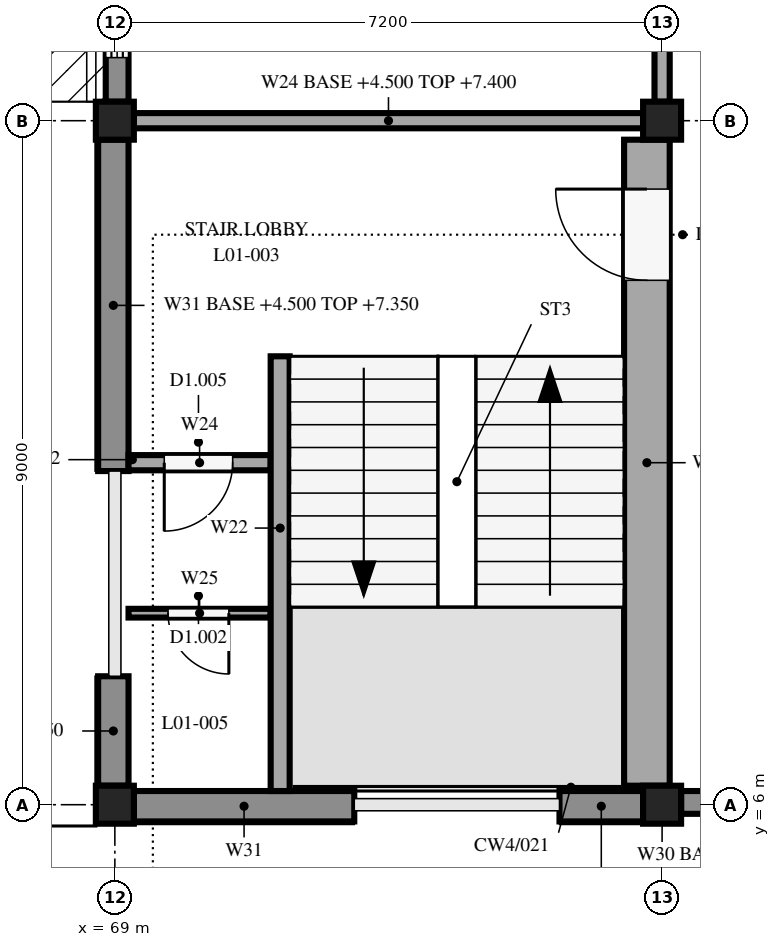
"""IFC4 building model, lengths in metres.
Left out: names, types, materials, properties, quantities, classifications, styles, units other than length and angle.
Written with IfcOpenShell. Run it as: python <this file> out.ifc"""

import sys

from ifc_helpers import new_model, si_unit, direction, frame, frame_2d, origin, origin_2d, place, context, subcontext, project, spatial, rectangle, extrude, element, fill, save


model = new_model("IFC4")
c1 = context("Model", 3, precision=1e-05, world=origin(), true_north=direction((0.0, 1.0)))
c2 = subcontext(c1, "Body", "Model", "MODEL_VIEW")
j1 = project(units=[si_unit("LENGTHUNIT", "METRE"), si_unit("PLANEANGLEUNIT", "RADIAN")], contexts=[c1])
p1 = place(None, origin())
s1 = spatial("IfcSite", under=j1, at=p1, CompositionType="ELEMENT")
p2 = place(p1, origin())
s2 = spatial("IfcBuilding", under=s1, at=p2, CompositionType="ELEMENT")
p3 = place(p2, frame((0.0, 0.0, 4.5)))
s3 = spatial("IfcBuildingStorey", under=s2, at=p3, CompositionType="ELEMENT", Elevation=4.5)
for number, where, z_axis, x_axis in (
    (1, (69.0, 6.0, 0.0), (0.0, 0.0, 1.0), (1.0, 0.0, 0.0)),
    (2, (69.0, 15.0, 0.0), (0.0, 0.0, 1.0), (1.0, 0.0, 0.0)),
    (3, (76.2, 6.0, 0.0), (0.0, 0.0, 1.0), (1.0, 0.0, 0.0)),
    (4, (76.2, 15.0, 0.0), (0.0, 0.0, 1.0), (1.0, 0.0, 0.0)),
):
    element("IfcColumn", number, at=place(p3, frame(where, z_axis=z_axis, x_axis=x_axis)), inside=s3, PredefinedType="COLUMN", context=c2, shape_type="SweptSolid", body=[
        extrude(rectangle(XDim=0.5, YDim=0.5, at=origin_2d()), origin(), (0.0, 0.0, 1.0), 3.35),
    ])
p4 = place(p3, frame((68.98, 6.25, 0.0), z_axis=(0.0, 0.0, 1.0), x_axis=(0.0, 1.0, 0.0)))
e5 = element("IfcWall", 5, at=p4, inside=s3, PredefinedType="STANDARD", context=c2, shape_type="SweptSolid", body=[
    extrude(rectangle(XDim=1.44, YDim=0.4, at=frame_2d((0.72, 0.0))), origin(), (0.0, 0.0, 1.0), 2.85),
])
p5 = place(p3, frame((68.98, 10.39, 0.0), z_axis=(0.0, 0.0, 1.0), x_axis=(0.0, 1.0, 0.0)))
e6 = element("IfcWall", 6, at=p5, inside=s3, PredefinedType="STANDARD", context=c2, shape_type="SweptSolid", body=[
    extrude(rectangle(XDim=4.36, YDim=0.4, at=frame_2d((2.18, 0.0))), origin(), (0.0, 0.0, 1.0), 2.85),
])
p6 = place(p3, frame((69.03, 15.25, 0.0), z_axis=(0.0, 0.0, 1.0), x_axis=(0.0, 1.0, 0.0)))
e7 = element("IfcWall", 7, at=p6, inside=s3, PredefinedType="STANDARD", context=c2, shape_type="SweptSolid", body=[
    extrude(rectangle(XDim=8.5, YDim=0.3, at=frame_2d((4.25, 0.0))), origin(), (0.0, 0.0, 1.0), 2.85),
])
p7 = place(p6, frame((0.58, 0.0, 0.3)))
e8 = element("IfcOpeningElement", 8, at=p7, cuts=e7, PredefinedType="OPENING", context=c2, shape_type="SweptSolid", body=[
    extrude(rectangle(XDim=1.4, YDim=2.5, at=frame_2d((0.7, 1.25))), frame((0.0, 0.16, 0.0), z_axis=(0.0, -1.0, 0.0), x_axis=(1.0, 0.0, 0.0)), (0.0, 0.0, 1.0), 0.32),
])
p8 = place(p6, frame((2.56, 0.0, 0.3)))
e9 = element("IfcOpeningElement", 9, at=p8, cuts=e7, PredefinedType="OPENING", context=c2, shape_type="SweptSolid", body=[
    extrude(rectangle(XDim=1.4, YDim=2.5, at=frame_2d((0.7, 1.25))), frame((0.0, 0.16, 0.0), z_axis=(0.0, -1.0, 0.0), x_axis=(1.0, 0.0, 0.0)), (0.0, 0.0, 1.0), 0.32),
])
p9 = place(p6, frame((4.54, 0.0, 0.3)))
e10 = element("IfcOpeningElement", 10, at=p9, cuts=e7, PredefinedType="OPENING", context=c2, shape_type="SweptSolid", body=[
    extrude(rectangle(XDim=1.4, YDim=2.5, at=frame_2d((0.7, 1.25))), frame((0.0, 0.16, 0.0), z_axis=(0.0, -1.0, 0.0), x_axis=(1.0, 0.0, 0.0)), (0.0, 0.0, 1.0), 0.32),
])
p10 = place(p6, frame((6.52, 0.0, 0.3)))
e11 = element("IfcOpeningElement", 11, at=p10, cuts=e7, PredefinedType="OPENING", context=c2, shape_type="SweptSolid", body=[
    extrude(rectangle(XDim=1.4, YDim=2.5, at=frame_2d((0.7, 1.25))), frame((0.0, 0.16, 0.0), z_axis=(0.0, -1.0, 0.0), x_axis=(1.0, 0.0, 0.0)), (0.0, 0.0, 1.0), 0.32),
])
p11 = place(p3, frame((72.15, 5.98, 0.0), z_axis=(0.0, 0.0, 1.0), x_axis=(-1.0, 0.0, 0.0)))
e12 = element("IfcWall", 12, at=p11, inside=s3, PredefinedType="STANDARD", context=c2, shape_type="SweptSolid", body=[
    extrude(rectangle(XDim=2.9, YDim=0.4, at=frame_2d((1.45, 0.0))), origin(), (0.0, 0.0, 1.0), 2.9),
])
p12 = place(p3, frame((75.95, 5.98, 0.0), z_axis=(0.0, 0.0, 1.0), x_axis=(-1.0, 0.0, 0.0)))
e13 = element("IfcWall", 13, at=p12, inside=s3, PredefinedType="STANDARD", context=c2, shape_type="SweptSolid", body=[
    extrude(rectangle(XDim=1.1, YDim=0.4, at=frame_2d((0.55, 0.0))), origin(), (0.0, 0.0, 1.0), 2.9),
])
p13 = place(p3, frame((78.65, 6.03, 0.0), z_axis=(0.0, 0.0, 1.0), x_axis=(-1.0, 0.0, 0.0)))
e14 = element("IfcWall", 14, at=p13, inside=s3, PredefinedType="STANDARD", context=c2, shape_type="SweptSolid", body=[
    extrude(rectangle(XDim=2.2, YDim=0.3, at=frame_2d((1.1, 0.0))), origin(), (0.0, 0.0, 1.0), 3.0),
])
p14 = place(p13, frame((0.3, 0.0, 0.0)))
e15 = element("IfcOpeningElement", 15, at=p14, cuts=e14, PredefinedType="OPENING", context=c2, shape_type="SweptSolid", body=[
    extrude(rectangle(XDim=1.6, YDim=2.4, at=frame_2d((0.8, 1.2))), frame((0.0, 0.16, 0.0), z_axis=(0.0, -1.0, 0.0), x_axis=(1.0, 0.0, 0.0)), (0.0, 0.0, 1.0), 0.32),
])
p15 = place(p3, frame((71.175, 6.18, 0.0), z_axis=(0.0, 0.0, 1.0), x_axis=(0.0, 1.0, 0.0)))
e16 = element("IfcWall", 16, at=p15, inside=s3, PredefinedType="SOLIDWALL", context=c2, shape_type="SweptSolid", body=[
    extrude(rectangle(XDim=5.72, YDim=0.25, at=frame_2d((2.86, 0.0))), origin(), (0.0, 0.0, 1.0), 3.35),
])
p16 = place(p3, frame((76.0, 6.25, 0.0), z_axis=(0.0, 0.0, 1.0), x_axis=(0.0, 1.0, 0.0)))
e17 = element("IfcWall", 17, at=p16, inside=s3, PredefinedType="SOLIDWALL", context=c2, shape_type="SweptSolid", body=[
    extrude(rectangle(XDim=8.5, YDim=0.6, at=frame_2d((4.25, 0.0))), origin(), (0.0, 0.0, 1.0), 3.35),
])
p17 = place(p16, frame((6.65, 0.0, 0.0)))
e18 = element("IfcOpeningElement", 18, at=p17, cuts=e17, PredefinedType="OPENING", context=c2, shape_type="SweptSolid", body=[
    extrude(rectangle(XDim=1.2, YDim=2.1, at=frame_2d((0.6, 1.05))), frame((0.0, 0.31, 0.0), z_axis=(0.0, -1.0, 0.0), x_axis=(1.0, 0.0, 0.0)), (0.0, 0.0, 1.0), 0.62),
])
p18 = place(p3, frame((71.05, 10.5, 0.0), z_axis=(0.0, 0.0, 1.0), x_axis=(-1.0, 0.0, 0.0)))
e19 = element("IfcWall", 19, at=p18, inside=s3, PredefinedType="SOLIDWALL", context=c2, shape_type="SweptSolid", body=[
    extrude(rectangle(XDim=1.87, YDim=0.2, at=frame_2d((0.935, 0.0))), origin(), (0.0, 0.0, 1.0), 3.35),
])
p19 = place(p18, frame((0.5, 0.0, 0.0)))
e20 = element("IfcOpeningElement", 20, at=p19, cuts=e19, PredefinedType="OPENING", context=c2, shape_type="SweptSolid", body=[
    extrude(rectangle(XDim=0.9, YDim=2.1, at=frame_2d((0.45, 1.05))), frame((0.0, 0.11, 0.0), z_axis=(0.0, -1.0, 0.0), x_axis=(1.0, 0.0, 0.0)), (0.0, 0.0, 1.0), 0.22),
])
p20 = place(p3, frame((71.05, 8.52, 0.0), z_axis=(0.0, 0.0, 1.0), x_axis=(-1.0, 0.0, 0.0)))
e21 = element("IfcWall", 21, at=p20, inside=s3, PredefinedType="PARTITIONING", context=c2, shape_type="SweptSolid", body=[
    extrude(rectangle(XDim=1.87, YDim=0.115, at=frame_2d((0.935, 0.0))), origin(), (0.0, 0.0, 1.0), 3.35),
])
p21 = place(p20, frame((0.55, 0.0, 0.0)))
e22 = element("IfcOpeningElement", 22, at=p21, cuts=e21, PredefinedType="OPENING", context=c2, shape_type="SweptSolid", body=[
    extrude(rectangle(XDim=0.8, YDim=2.1, at=frame_2d((0.4, 1.05))), frame((0.0, 0.067, 0.0), z_axis=(0.0, -1.0, 0.0), x_axis=(1.0, 0.0, 0.0)), (0.0, 0.0, 1.0), 0.135),
])
p22 = place(p3, frame((69.25, 15.0, 0.0), z_axis=(0.0, 0.0, 1.0), x_axis=(1.0, 0.0, 0.0)))
e23 = element("IfcWall", 23, at=p22, inside=s3, PredefinedType="SOLIDWALL", context=c2, shape_type="SweptSolid", body=[
    extrude(rectangle(XDim=6.7, YDim=0.2, at=frame_2d((3.35, 0.0))), origin(), (0.0, 0.0, 1.0), 2.9),
])
p23 = place(p3, frame((76.2, 15.25, 0.0), z_axis=(0.0, 0.0, 1.0), x_axis=(0.0, 1.0, 0.0)))
e24 = element("IfcWall", 24, at=p23, inside=s3, PredefinedType="PARTITIONING", context=c2, shape_type="SweptSolid", body=[
    extrude(rectangle(XDim=8.5, YDim=0.2, at=frame_2d((4.25, 0.0))), origin(), (0.0, 0.0, 1.0), 2.9),
])
p24 = place(p23, frame((3.5, 0.0, 0.0)))
e25 = element("IfcOpeningElement", 25, at=p24, cuts=e24, PredefinedType="OPENING", context=c2, shape_type="SweptSolid", body=[
    extrude(rectangle(XDim=1.5, YDim=2.1, at=frame_2d((0.75, 1.05))), frame((0.0, 0.11, 0.0), z_axis=(0.0, -1.0, 0.0), x_axis=(1.0, 0.0, 0.0)), (0.0, 0.0, 1.0), 0.22),
])
p25 = place(p7, origin())
e26 = element("IfcWindow", 26, at=p25, inside=s3, PartitioningType="DOUBLE_PANEL_VERTICAL", PredefinedType="WINDOW", context=c2, shape_type="SweptSolid", body=[
    extrude(rectangle(XDim=1.4, YDim=2.5, at=frame_2d((0.7, 1.25))), frame((0.0, 0.03, 0.0), z_axis=(0.0, -1.0, 0.0), x_axis=(1.0, 0.0, 0.0)), (0.0, 0.0, 1.0), 0.06),
])
fill(e8, e26)
p26 = place(p17, origin())
e27 = element("IfcDoor", 27, at=p26, inside=s3, OperationType="SINGLE_SWING_RIGHT", PredefinedType="DOOR", context=c2, shape_type="SweptSolid", body=[
    extrude(rectangle(XDim=1.2, YDim=2.1, at=frame_2d((0.6, 1.05))), frame((0.0, 0.025, 0.0), z_axis=(0.0, -1.0, 0.0), x_axis=(1.0, 0.0, 0.0)), (0.0, 0.0, 1.0), 0.05),
])
fill(e18, e27)
p27 = place(p19, origin())
e28 = element("IfcDoor", 28, at=p27, inside=s3, OperationType="SINGLE_SWING_RIGHT", PredefinedType="DOOR", context=c2, shape_type="SweptSolid", body=[
    extrude(rectangle(XDim=0.9, YDim=2.1, at=frame_2d((0.45, 1.05))), frame((0.0, 0.025, 0.0), z_axis=(0.0, -1.0, 0.0), x_axis=(1.0, 0.0, 0.0)), (0.0, 0.0, 1.0), 0.05),
])
fill(e20, e28)
p28 = place(p21, origin())
e29 = element("IfcDoor", 29, at=p28, inside=s3, OperationType="SINGLE_SWING_LEFT", PredefinedType="DOOR", context=c2, shape_type="SweptSolid", body=[
    extrude(rectangle(XDim=0.8, YDim=2.1, at=frame_2d((0.4, 1.05))), frame((0.0, 0.025, 0.0), z_axis=(0.0, -1.0, 0.0), x_axis=(1.0, 0.0, 0.0)), (0.0, 0.0, 1.0), 0.05),
])
fill(e22, e29)
save(model, sys.argv[1])
